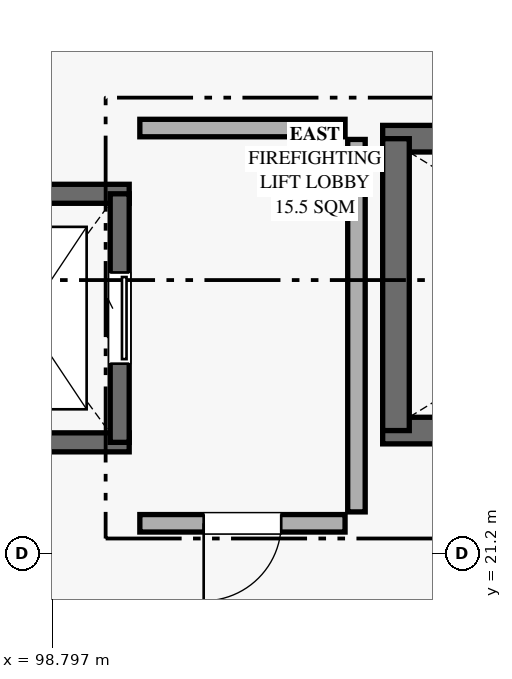
"""IFC4 building model, lengths in metres.
Left out: names, types, materials, properties, quantities, classifications, styles, units other than length and angle.
Written with IfcOpenShell. Run it as: python <this file> out.ifc"""

import sys

from ifc_helpers import new_model, si_unit, direction, frame, frame_2d, origin, place, context, subcontext, project, spatial, rectangle, extrude, element, fill, save


model = new_model("IFC4")
c1 = context("Model", 3, precision=1e-05, world=origin(), true_north=direction((0.0, 1.0)))
c2 = subcontext(c1, "Body", "Model", "MODEL_VIEW")
j1 = project(units=[si_unit("LENGTHUNIT", "METRE"), si_unit("PLANEANGLEUNIT", "RADIAN")], contexts=[c1])
p1 = place(None, origin())
s1 = spatial("IfcSite", under=j1, at=p1, CompositionType="ELEMENT")
p2 = place(p1, origin())
s2 = spatial("IfcBuilding", under=s1, at=p2, CompositionType="ELEMENT")
p3 = place(p2, origin())
s3 = spatial("IfcBuildingStorey", under=s2, at=p3, CompositionType="ELEMENT", Elevation=0.0)
for number, where, z_axis, x_axis in (
    (1, (111.155, 22.82, 0.0), (0.0, 0.0, 1.0), (-1.0, 0.0, 0.0)),
    (2, (103.145, 26.66, 0.0), (0.0, 0.0, 1.0), (1.0, 0.0, 0.0)),
):
    element("IfcWall", number, at=place(p3, frame(where, z_axis=z_axis, x_axis=x_axis)), inside=s3, PredefinedType="SHEAR", context=c2, shape_type="SweptSolid", body=[
        extrude(rectangle(XDim=8.01, YDim=0.35, at=frame_2d((4.005, 0.0))), origin(), (0.0, 0.0, 1.0), 5.13),
    ])
p4 = place(p3, frame((103.32, 22.82, 0.0), z_axis=(0.0, 0.0, 1.0), x_axis=(0.0, 1.0, 0.0)))
e3 = element("IfcWall", 3, at=p4, inside=s3, PredefinedType="SHEAR", context=c2, shape_type="SweptSolid", body=[
    extrude(rectangle(XDim=3.84, YDim=0.35, at=frame_2d((1.92, 0.0))), origin(), (0.0, 0.0, 1.0), 5.13),
])
for number, where, z_axis, x_axis in (
    (4, (99.81, 22.665, 0.0), (0.0, 0.0, 1.0), (-1.0, 0.0, 0.0)),
    (5, (97.09, 25.935, 0.0), (0.0, 0.0, 1.0), (1.0, 0.0, 0.0)),
):
    element("IfcWall", number, at=place(p3, frame(where, z_axis=z_axis, x_axis=x_axis)), inside=s3, PredefinedType="SHEAR", context=c2, shape_type="SweptSolid", body=[
        extrude(rectangle(XDim=2.72, YDim=0.25, at=frame_2d((1.36, 0.0))), origin(), (0.0, 0.0, 1.0), 5.13),
    ])
p5 = place(p3, frame((99.685, 25.935, 0.0), z_axis=(0.0, 0.0, 1.0), x_axis=(0.0, -1.0, 0.0)))
e6 = element("IfcWall", 6, at=p5, inside=s3, PredefinedType="SHEAR", context=c2, shape_type="SweptSolid", body=[
    extrude(rectangle(XDim=3.27, YDim=0.25, at=frame_2d((1.635, 0.0))), origin(), (0.0, 0.0, 1.0), 5.13),
])
p6 = place(p5, frame((1.035, 0.0, 0.0)))
e7 = element("IfcOpeningElement", 7, at=p6, cuts=e6, PredefinedType="OPENING", context=c2, shape_type="SweptSolid", body=[
    extrude(rectangle(XDim=1.2, YDim=2.25, at=frame_2d((0.6, 1.125))), frame((0.0, 0.135, 0.0), z_axis=(0.0, -1.0, 0.0), x_axis=(1.0, 0.0, 0.0)), (0.0, 0.0, 1.0), 0.27),
])
p7 = place(p3, frame((102.65, 21.6, 0.0), z_axis=(0.0, 0.0, 1.0), x_axis=(-1.0, 0.0, 0.0)))
e8 = element("IfcWall", 8, at=p7, inside=s3, PredefinedType="PARTITIONING", context=c2, shape_type="SweptSolid", body=[
    extrude(rectangle(XDim=2.7, YDim=0.23, at=frame_2d((1.35, 0.0))), origin(), (0.0, 0.0, 1.0), 3.88),
])
p8 = place(p7, frame((0.84, 0.0, 0.0)))
e9 = element("IfcOpeningElement", 9, at=p8, cuts=e8, PredefinedType="OPENING", context=c2, shape_type="SweptSolid", body=[
    extrude(rectangle(XDim=1.02, YDim=2.18, at=frame_2d((0.51, 1.09))), frame((0.0, 0.125, 0.0), z_axis=(0.0, -1.0, 0.0), x_axis=(1.0, 0.0, 0.0)), (0.0, 0.0, 1.0), 0.25),
])
p9 = place(p3, frame((99.95, 26.8, 0.0), z_axis=(0.0, 0.0, 1.0), x_axis=(1.0, 0.0, 0.0)))
e10 = element("IfcWall", 10, at=p9, inside=s3, PredefinedType="PARTITIONING", context=c2, shape_type="SweptSolid", body=[
    extrude(rectangle(XDim=2.7, YDim=0.23, at=frame_2d((1.35, 0.0))), origin(), (0.0, 0.0, 1.0), 3.88),
])
p10 = place(p3, frame((102.8, 26.65, 0.0), z_axis=(0.0, 0.0, 1.0), x_axis=(0.0, -1.0, 0.0)))
e11 = element("IfcWall", 11, at=p10, inside=s3, PredefinedType="PARTITIONING", context=c2, shape_type="SweptSolid", body=[
    extrude(rectangle(XDim=4.9, YDim=0.23, at=frame_2d((2.45, 0.0))), origin(), (0.0, 0.0, 1.0), 3.88),
])
p11 = place(p6, origin())
e12 = element("IfcDoor", 12, at=p11, inside=s3, OperationType="SLIDING_TO_LEFT", PredefinedType="DOOR", context=c2, shape_type="SweptSolid", body=[
    extrude(rectangle(XDim=1.2, YDim=2.25, at=frame_2d((0.6, 1.125))), frame((0.0, 0.025, 0.0), z_axis=(0.0, -1.0, 0.0), x_axis=(1.0, 0.0, 0.0)), (0.0, 0.0, 1.0), 0.05),
])
fill(e7, e12)
p12 = place(p8, origin())
e13 = element("IfcDoor", 13, at=p12, inside=s3, OperationType="SINGLE_SWING_RIGHT", PredefinedType="DOOR", context=c2, shape_type="SweptSolid", body=[
    extrude(rectangle(XDim=1.02, YDim=2.18, at=frame_2d((0.51, 1.09))), frame((0.0, 0.025, 0.0), z_axis=(0.0, -1.0, 0.0), x_axis=(1.0, 0.0, 0.0)), (0.0, 0.0, 1.0), 0.05),
])
fill(e9, e13)
save(model, sys.argv[1])
